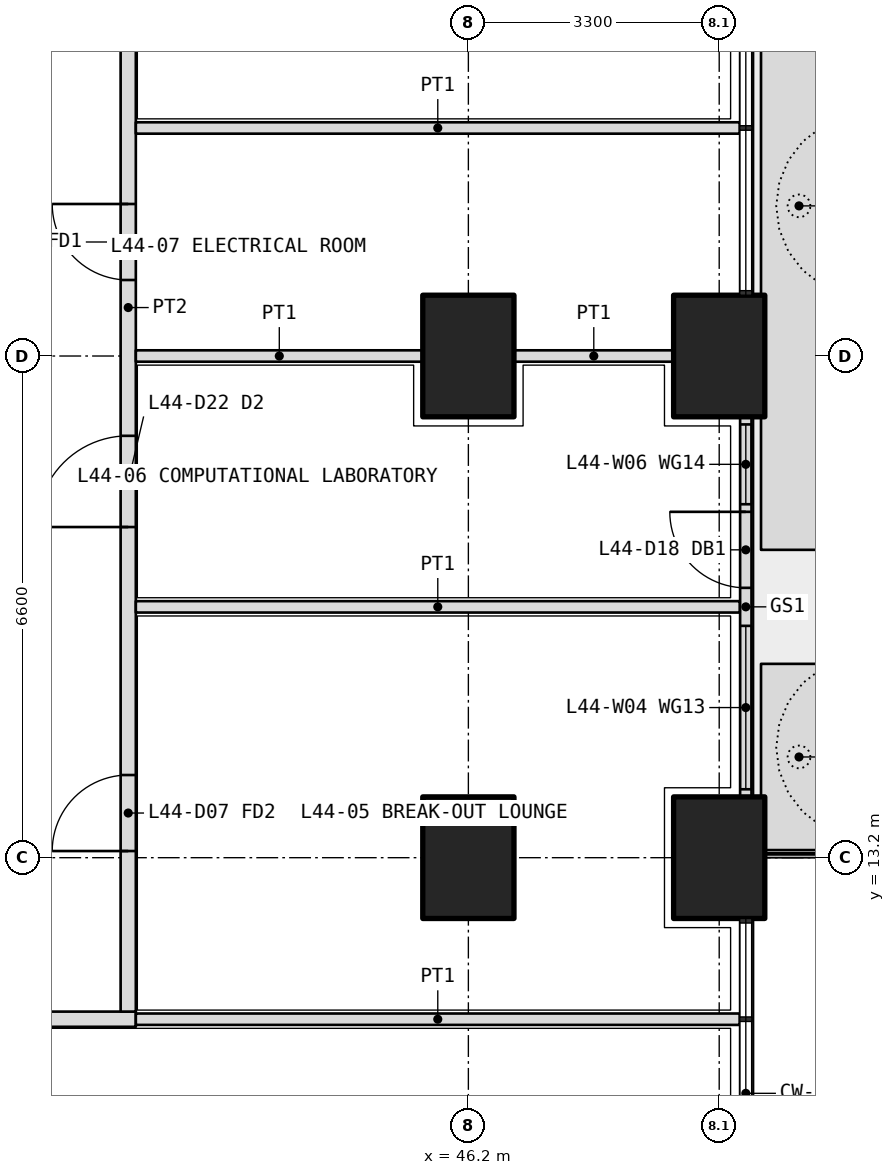
"""IFC4 building model, lengths in metres.
Left out: names, types, materials, properties, quantities, classifications, styles, units other than length and angle.
Written with IfcOpenShell. Run it as: python <this file> out.ifc"""

import sys

from ifc_helpers import new_model, si_unit, direction, frame, frame_2d, origin, origin_2d, place, context, subcontext, project, spatial, polyline, rectangle, outline, extrude, element, fill, save


model = new_model("IFC4")
c1 = context("Model", 3, precision=1e-05, world=origin(), true_north=direction((0.0, 1.0)))
c2 = subcontext(c1, "Body", "Model", "MODEL_VIEW")
j1 = project(units=[si_unit("LENGTHUNIT", "METRE"), si_unit("PLANEANGLEUNIT", "RADIAN")], contexts=[c1])
p1 = place(None, origin())
s1 = spatial("IfcSite", under=j1, at=p1, CompositionType="ELEMENT")
p2 = place(p1, origin())
s2 = spatial("IfcBuilding", under=s1, at=p2, CompositionType="ELEMENT")
p3 = place(p2, frame((0.0, 0.0, 193.5)))
s3 = spatial("IfcBuildingStorey", under=s2, at=p3, CompositionType="ELEMENT", Elevation=193.5)
for number, where, z_axis, x_axis in (
    (1, (49.5, 13.2, 0.0), (0.0, 0.0, 1.0), (0.0, 1.0, 0.0)),
    (2, (49.5, 19.8, 0.0), (0.0, 0.0, 1.0), (0.0, 1.0, 0.0)),
    (3, (46.2, 13.2, 0.0), (0.0, 0.0, 1.0), (0.0, 1.0, 0.0)),
    (4, (46.2, 19.8, 0.0), (0.0, 0.0, 1.0), (0.0, 1.0, 0.0)),
):
    element("IfcColumn", number, at=place(p3, frame(where, z_axis=z_axis, x_axis=x_axis)), inside=s3, PredefinedType="COLUMN", context=c2, shape_type="SweptSolid", body=[
        extrude(rectangle(XDim=1.6, YDim=1.2, at=origin_2d()), origin(), (0.0, 0.0, 1.0), 4.2),
    ])
p4 = place(p3, origin())
e5 = element("IfcWall", 5, at=p4, inside=s3, PredefinedType="USERDEFINED", context=c2, shape_type="SweptSolid", body=[
    extrude(outline(polyline([(50.05, 13.3), (51.05, 13.3), (51.05, 15.75), (50.05, 15.75), (50.05, 13.3)]), holes=[polyline([(50.2, 13.45), (50.9, 13.45), (50.9, 15.6), (50.2, 15.6), (50.2, 13.45)])]), origin(), (0.0, 0.0, 1.0), 1.05),
])
p5 = place(p3, origin())
e6 = element("IfcWall", 6, at=p5, inside=s3, PredefinedType="USERDEFINED", context=c2, shape_type="SweptSolid", body=[
    extrude(outline(polyline([(50.05, 17.25), (51.05, 17.25), (51.05, 26.3), (50.05, 26.3), (50.05, 17.25)]), holes=[polyline([(50.2, 17.4), (50.9, 17.4), (50.9, 26.15), (50.2, 26.15), (50.2, 17.4)])]), origin(), (0.0, 0.0, 1.0), 1.05),
])
p6 = place(p3, frame((49.85, 14.0, 0.0), z_axis=(0.0, 0.0, 1.0), x_axis=(0.0, 1.0, 0.0)))
e7 = element("IfcWall", 7, at=p6, inside=s3, PredefinedType="SOLIDWALL", context=c2, shape_type="SweptSolid", body=[
    extrude(rectangle(XDim=5.0, YDim=0.15, at=frame_2d((2.5, 0.0))), origin(), (0.0, 0.0, 1.0), 2.7),
])
p7 = place(p6, frame((2.75, 0.0, 0.0)))
e8 = element("IfcOpeningElement", 8, at=p7, cuts=e7, PredefinedType="OPENING", context=c2, shape_type="SweptSolid", body=[
    extrude(rectangle(XDim=1.0, YDim=2.4, at=frame_2d((0.5, 1.2))), frame((0.0, 0.085, 0.0), z_axis=(0.0, -1.0, 0.0), x_axis=(1.0, 0.0, 0.0)), (0.0, 0.0, 1.0), 0.17),
])
p8 = place(p6, frame((0.1, 0.0, 0.1)))
e9 = element("IfcOpeningElement", 9, at=p8, cuts=e7, PredefinedType="OPENING", context=c2, shape_type="SweptSolid", body=[
    extrude(rectangle(XDim=2.15, YDim=2.3, at=frame_2d((1.075, 1.15))), frame((0.0, 0.085, 0.0), z_axis=(0.0, -1.0, 0.0), x_axis=(1.0, 0.0, 0.0)), (0.0, 0.0, 1.0), 0.17),
])
p9 = place(p6, frame((3.85, 0.0, 0.1)))
e10 = element("IfcOpeningElement", 10, at=p9, cuts=e7, PredefinedType="OPENING", context=c2, shape_type="SweptSolid", body=[
    extrude(rectangle(XDim=1.05, YDim=2.3, at=frame_2d((0.525, 1.15))), frame((0.0, 0.085, 0.0), z_axis=(0.0, -1.0, 0.0), x_axis=(1.0, 0.0, 0.0)), (0.0, 0.0, 1.0), 0.17),
])
p10 = place(p3, frame((10.975, 11.075, 0.0), z_axis=(0.0, 0.0, 1.0), x_axis=(1.0, 0.0, 0.0)))
e11 = element("IfcWall", 11, at=p10, inside=s3, PredefinedType="PARTITIONING", context=c2, shape_type="SweptSolid", body=[
    extrude(rectangle(XDim=30.85, YDim=0.2, at=frame_2d((15.425, 0.0))), origin(), (0.0, 0.0, 1.0), 2.85),
])
p11 = place(p10, frame((5.512, 0.0, 0.0)))
e12 = element("IfcOpeningElement", 12, at=p11, cuts=e11, PredefinedType="OPENING", context=c2, shape_type="SweptSolid", body=[
    extrude(rectangle(XDim=1.2, YDim=2.1, at=frame_2d((0.6, 1.05))), frame((0.0, 0.11, 0.0), z_axis=(0.0, -1.0, 0.0), x_axis=(1.0, 0.0, 0.0)), (0.0, 0.0, 1.0), 0.22),
])
p12 = place(p10, frame((13.725, 0.0, 0.0)))
e13 = element("IfcOpeningElement", 13, at=p12, cuts=e11, PredefinedType="OPENING", context=c2, shape_type="SweptSolid", body=[
    extrude(rectangle(XDim=1.0, YDim=2.1, at=frame_2d((0.5, 1.05))), frame((0.0, 0.11, 0.0), z_axis=(0.0, -1.0, 0.0), x_axis=(1.0, 0.0, 0.0)), (0.0, 0.0, 1.0), 0.22),
])
p13 = place(p10, frame((17.025, 0.0, 0.0)))
e14 = element("IfcOpeningElement", 14, at=p13, cuts=e11, PredefinedType="OPENING", context=c2, shape_type="SweptSolid", body=[
    extrude(rectangle(XDim=1.0, YDim=2.1, at=frame_2d((0.5, 1.05))), frame((0.0, 0.11, 0.0), z_axis=(0.0, -1.0, 0.0), x_axis=(1.0, 0.0, 0.0)), (0.0, 0.0, 1.0), 0.22),
])
p14 = place(p10, frame((24.238, 0.0, 0.0)))
e15 = element("IfcOpeningElement", 15, at=p14, cuts=e11, PredefinedType="OPENING", context=c2, shape_type="SweptSolid", body=[
    extrude(rectangle(XDim=1.0, YDim=2.1, at=frame_2d((0.5, 1.05))), frame((0.0, 0.11, 0.0), z_axis=(0.0, -1.0, 0.0), x_axis=(1.0, 0.0, 0.0)), (0.0, 0.0, 1.0), 0.22),
])
p15 = place(p3, frame((41.725, 11.175, 0.0), z_axis=(0.0, 0.0, 1.0), x_axis=(0.0, 1.0, 0.0)))
e16 = element("IfcWall", 16, at=p15, inside=s3, PredefinedType="PARTITIONING", context=c2, shape_type="SweptSolid", body=[
    extrude(rectangle(XDim=18.525, YDim=0.2, at=frame_2d((9.262, 0.0))), origin(), (0.0, 0.0, 1.0), 2.85),
])
p16 = place(p15, frame((2.113, 0.0, 0.0)))
e17 = element("IfcOpeningElement", 17, at=p16, cuts=e16, PredefinedType="OPENING", context=c2, shape_type="SweptSolid", body=[
    extrude(rectangle(XDim=1.0, YDim=2.1, at=frame_2d((0.5, 1.05))), frame((0.0, 0.11, 0.0), z_axis=(0.0, -1.0, 0.0), x_axis=(1.0, 0.0, 0.0)), (0.0, 0.0, 1.0), 0.22),
])
p17 = place(p15, frame((6.375, 0.0, 0.0)))
e18 = element("IfcOpeningElement", 18, at=p17, cuts=e16, PredefinedType="OPENING", context=c2, shape_type="SweptSolid", body=[
    extrude(rectangle(XDim=1.2, YDim=2.1, at=frame_2d((0.6, 1.05))), frame((0.0, 0.11, 0.0), z_axis=(0.0, -1.0, 0.0), x_axis=(1.0, 0.0, 0.0)), (0.0, 0.0, 1.0), 0.22),
])
p18 = place(p15, frame((9.625, 0.0, 0.0)))
e19 = element("IfcOpeningElement", 19, at=p18, cuts=e16, PredefinedType="OPENING", context=c2, shape_type="SweptSolid", body=[
    extrude(rectangle(XDim=1.0, YDim=2.1, at=frame_2d((0.5, 1.05))), frame((0.0, 0.11, 0.0), z_axis=(0.0, -1.0, 0.0), x_axis=(1.0, 0.0, 0.0)), (0.0, 0.0, 1.0), 0.22),
])
p19 = place(p15, frame((12.975, 0.0, 0.0)))
e20 = element("IfcOpeningElement", 20, at=p19, cuts=e16, PredefinedType="OPENING", context=c2, shape_type="SweptSolid", body=[
    extrude(rectangle(XDim=0.9, YDim=2.1, at=frame_2d((0.45, 1.05))), frame((0.0, 0.11, 0.0), z_axis=(0.0, -1.0, 0.0), x_axis=(1.0, 0.0, 0.0)), (0.0, 0.0, 1.0), 0.22),
])
p20 = place(p15, frame((16.375, 0.0, 0.0)))
e21 = element("IfcOpeningElement", 21, at=p20, cuts=e16, PredefinedType="OPENING", context=c2, shape_type="SweptSolid", body=[
    extrude(rectangle(XDim=1.0, YDim=2.1, at=frame_2d((0.5, 1.05))), frame((0.0, 0.11, 0.0), z_axis=(0.0, -1.0, 0.0), x_axis=(1.0, 0.0, 0.0)), (0.0, 0.0, 1.0), 0.22),
])
for number, where, z_axis, x_axis in (
    (22, (49.77, 11.075, 0.0), (0.0, 0.0, 1.0), (-1.0, 0.0, 0.0)),
    (23, (49.77, 22.8, 0.0), (0.0, 0.0, 1.0), (-1.0, 0.0, 0.0)),
    (24, (49.77, 16.5, 0.0), (0.0, 0.0, 1.0), (-1.0, 0.0, 0.0)),
):
    element("IfcWall", number, at=place(p3, frame(where, z_axis=z_axis, x_axis=x_axis)), inside=s3, PredefinedType="PARTITIONING", context=c2, shape_type="SweptSolid", body=[
        extrude(rectangle(XDim=7.945, YDim=0.15, at=frame_2d((3.973, 0.0))), origin(), (0.0, 0.0, 1.0), 2.7),
    ])
p21 = place(p3, frame((48.9, 19.8, 0.0), z_axis=(0.0, 0.0, 1.0), x_axis=(-1.0, 0.0, 0.0)))
e25 = element("IfcWall", 25, at=p21, inside=s3, PredefinedType="PARTITIONING", context=c2, shape_type="SweptSolid", body=[
    extrude(rectangle(XDim=2.1, YDim=0.15, at=frame_2d((1.05, 0.0))), origin(), (0.0, 0.0, 1.0), 2.85),
])
p22 = place(p3, frame((45.6, 19.8, 0.0), z_axis=(0.0, 0.0, 1.0), x_axis=(-1.0, 0.0, 0.0)))
e26 = element("IfcWall", 26, at=p22, inside=s3, PredefinedType="PARTITIONING", context=c2, shape_type="SweptSolid", body=[
    extrude(rectangle(XDim=3.775, YDim=0.15, at=frame_2d((1.888, 0.0))), origin(), (0.0, 0.0, 1.0), 2.85),
])
p23 = place(p7, origin())
e27 = element("IfcDoor", 27, at=p23, inside=s3, OperationType="SINGLE_SWING_RIGHT", PredefinedType="DOOR", context=c2, shape_type="SweptSolid", body=[
    extrude(rectangle(XDim=1.0, YDim=2.4, at=frame_2d((0.5, 1.2))), frame((0.0, 0.025, 0.0), z_axis=(0.0, -1.0, 0.0), x_axis=(1.0, 0.0, 0.0)), (0.0, 0.0, 1.0), 0.05),
])
fill(e8, e27)
p24 = place(p8, origin())
e28 = element("IfcWindow", 28, at=p24, inside=s3, PartitioningType="SINGLE_PANEL", PredefinedType="WINDOW", context=c2, shape_type="SweptSolid", body=[
    extrude(rectangle(XDim=2.15, YDim=2.3, at=frame_2d((1.075, 1.15))), frame((0.0, 0.03, 0.0), z_axis=(0.0, -1.0, 0.0), x_axis=(1.0, 0.0, 0.0)), (0.0, 0.0, 1.0), 0.06),
])
fill(e9, e28)
p25 = place(p9, origin())
e29 = element("IfcWindow", 29, at=p25, inside=s3, PartitioningType="SINGLE_PANEL", PredefinedType="WINDOW", context=c2, shape_type="SweptSolid", body=[
    extrude(rectangle(XDim=1.05, YDim=2.3, at=frame_2d((0.525, 1.15))), frame((0.0, 0.03, 0.0), z_axis=(0.0, -1.0, 0.0), x_axis=(1.0, 0.0, 0.0)), (0.0, 0.0, 1.0), 0.06),
])
fill(e10, e29)
p26 = place(p16, origin())
e30 = element("IfcDoor", 30, at=p26, inside=s3, OperationType="SINGLE_SWING_LEFT", PredefinedType="DOOR", context=c2, shape_type="SweptSolid", body=[
    extrude(rectangle(XDim=1.0, YDim=2.1, at=frame_2d((0.5, 1.05))), frame((0.0, 0.025, 0.0), z_axis=(0.0, -1.0, 0.0), x_axis=(1.0, 0.0, 0.0)), (0.0, 0.0, 1.0), 0.05),
])
fill(e17, e30)
p27 = place(p17, origin())
e31 = element("IfcDoor", 31, at=p27, inside=s3, OperationType="DOUBLE_DOOR_SINGLE_SWING", PredefinedType="DOOR", context=c2, shape_type="SweptSolid", body=[
    extrude(rectangle(XDim=1.2, YDim=2.1, at=frame_2d((0.6, 1.05))), frame((0.0, 0.025, 0.0), z_axis=(0.0, -1.0, 0.0), x_axis=(1.0, 0.0, 0.0)), (0.0, 0.0, 1.0), 0.05),
])
fill(e18, e31)
p28 = place(p18, origin())
e32 = element("IfcDoor", 32, at=p28, inside=s3, OperationType="SINGLE_SWING_RIGHT", PredefinedType="DOOR", context=c2, shape_type="SweptSolid", body=[
    extrude(rectangle(XDim=1.0, YDim=2.1, at=frame_2d((0.5, 1.05))), frame((0.0, 0.025, 0.0), z_axis=(0.0, -1.0, 0.0), x_axis=(1.0, 0.0, 0.0)), (0.0, 0.0, 1.0), 0.05),
])
fill(e19, e32)
save(model, sys.argv[1])
